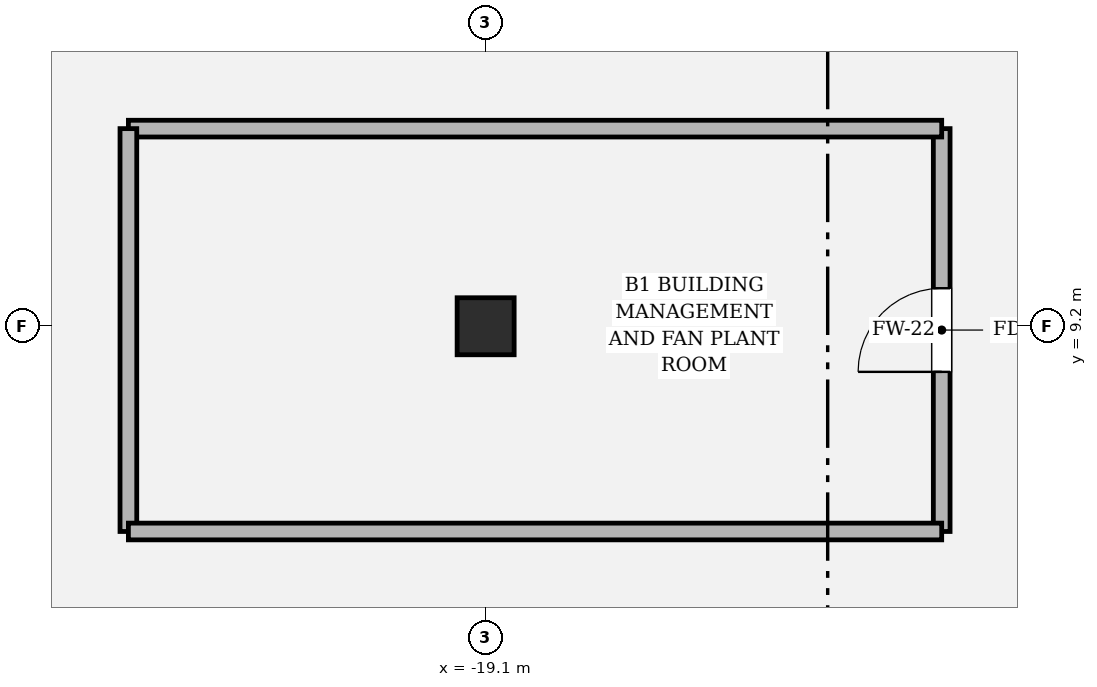
"""IFC4 building model, lengths in metres.
Left out: names, types, materials, properties, quantities, classifications, styles, units other than length and angle.
Written with IfcOpenShell. Run it as: python <this file> out.ifc"""

import sys

from ifc_helpers import new_model, si_unit, direction, frame, frame_2d, origin, origin_2d, place, context, subcontext, project, spatial, rectangle, circle, extrude, element, fill, save


model = new_model("IFC4")
c1 = context("Model", 3, precision=1e-05, world=origin(), true_north=direction((0.0, 1.0)))
c2 = subcontext(c1, "Body", "Model", "MODEL_VIEW")
j1 = project(units=[si_unit("LENGTHUNIT", "METRE"), si_unit("PLANEANGLEUNIT", "RADIAN")], contexts=[c1])
p1 = place(None, origin())
s1 = spatial("IfcSite", under=j1, at=p1, CompositionType="ELEMENT")
p2 = place(p1, origin())
s2 = spatial("IfcBuilding", under=s1, at=p2, CompositionType="ELEMENT")
p3 = place(p2, frame((0.0, 0.0, -4.8)))
s3 = spatial("IfcBuildingStorey", under=s2, at=p3, CompositionType="ELEMENT", Elevation=-4.8)
p4 = place(p3, frame((-19.1, 9.2, 0.0), z_axis=(0.0, 0.0, 1.0), x_axis=(1.0, 0.0, 0.0)))
e1 = element("IfcColumn", 1, at=p4, inside=s3, PredefinedType="PILASTER", context=c2, shape_type="SweptSolid", body=[
    extrude(circle(Radius=0.375, at=origin_2d()), origin(), (0.0, 0.0, 1.0), 4.8),
])
p5 = place(p3, frame((-13.1, 6.5, 0.0), z_axis=(0.0, 0.0, 1.0), x_axis=(0.0, 1.0, 0.0)))
e2 = element("IfcWall", 2, at=p5, inside=s3, PredefinedType="SOLIDWALL", context=c2, shape_type="SweptSolid", body=[
    extrude(rectangle(XDim=5.3, YDim=0.22, at=frame_2d((2.65, 0.0))), origin(), (0.0, 0.0, 1.0), 3.814),
])
p6 = place(p5, frame((2.1, 0.0, 0.0)))
e3 = element("IfcOpeningElement", 3, at=p6, cuts=e2, PredefinedType="OPENING", context=c2, shape_type="SweptSolid", body=[
    extrude(rectangle(XDim=1.1, YDim=2.2, at=frame_2d((0.55, 1.1))), frame((0.0, 0.12, 0.0), z_axis=(0.0, -1.0, 0.0), x_axis=(1.0, 0.0, 0.0)), (0.0, 0.0, 1.0), 0.24),
])
p7 = place(p3, frame((-13.1, 11.8, 0.0), z_axis=(0.0, 0.0, 1.0), x_axis=(-1.0, 0.0, 0.0)))
e4 = element("IfcWall", 4, at=p7, inside=s3, PredefinedType="SOLIDWALL", context=c2, shape_type="SweptSolid", body=[
    extrude(rectangle(XDim=10.7, YDim=0.22, at=frame_2d((5.35, 0.0))), origin(), (0.0, 0.0, 1.0), 3.814),
])
p8 = place(p3, frame((-23.8, 11.8, 0.0), z_axis=(0.0, 0.0, 1.0), x_axis=(0.0, -1.0, 0.0)))
e5 = element("IfcWall", 5, at=p8, inside=s3, PredefinedType="SOLIDWALL", context=c2, shape_type="SweptSolid", body=[
    extrude(rectangle(XDim=5.3, YDim=0.22, at=frame_2d((2.65, 0.0))), origin(), (0.0, 0.0, 1.0), 3.814),
])
p9 = place(p3, frame((-23.8, 6.5, 0.0), z_axis=(0.0, 0.0, 1.0), x_axis=(1.0, 0.0, 0.0)))
e6 = element("IfcWall", 6, at=p9, inside=s3, PredefinedType="SOLIDWALL", context=c2, shape_type="SweptSolid", body=[
    extrude(rectangle(XDim=10.7, YDim=0.22, at=frame_2d((5.35, 0.0))), origin(), (0.0, 0.0, 1.0), 3.814),
])
p10 = place(p6, origin())
e7 = element("IfcDoor", 7, at=p10, inside=s3, OperationType="SINGLE_SWING_LEFT", PredefinedType="DOOR", context=c2, shape_type="SweptSolid", body=[
    extrude(rectangle(XDim=1.1, YDim=2.2, at=frame_2d((0.55, 1.1))), frame((0.0, 0.025, 0.0), z_axis=(0.0, -1.0, 0.0), x_axis=(1.0, 0.0, 0.0)), (0.0, 0.0, 1.0), 0.05),
])
fill(e3, e7)
save(model, sys.argv[1])
